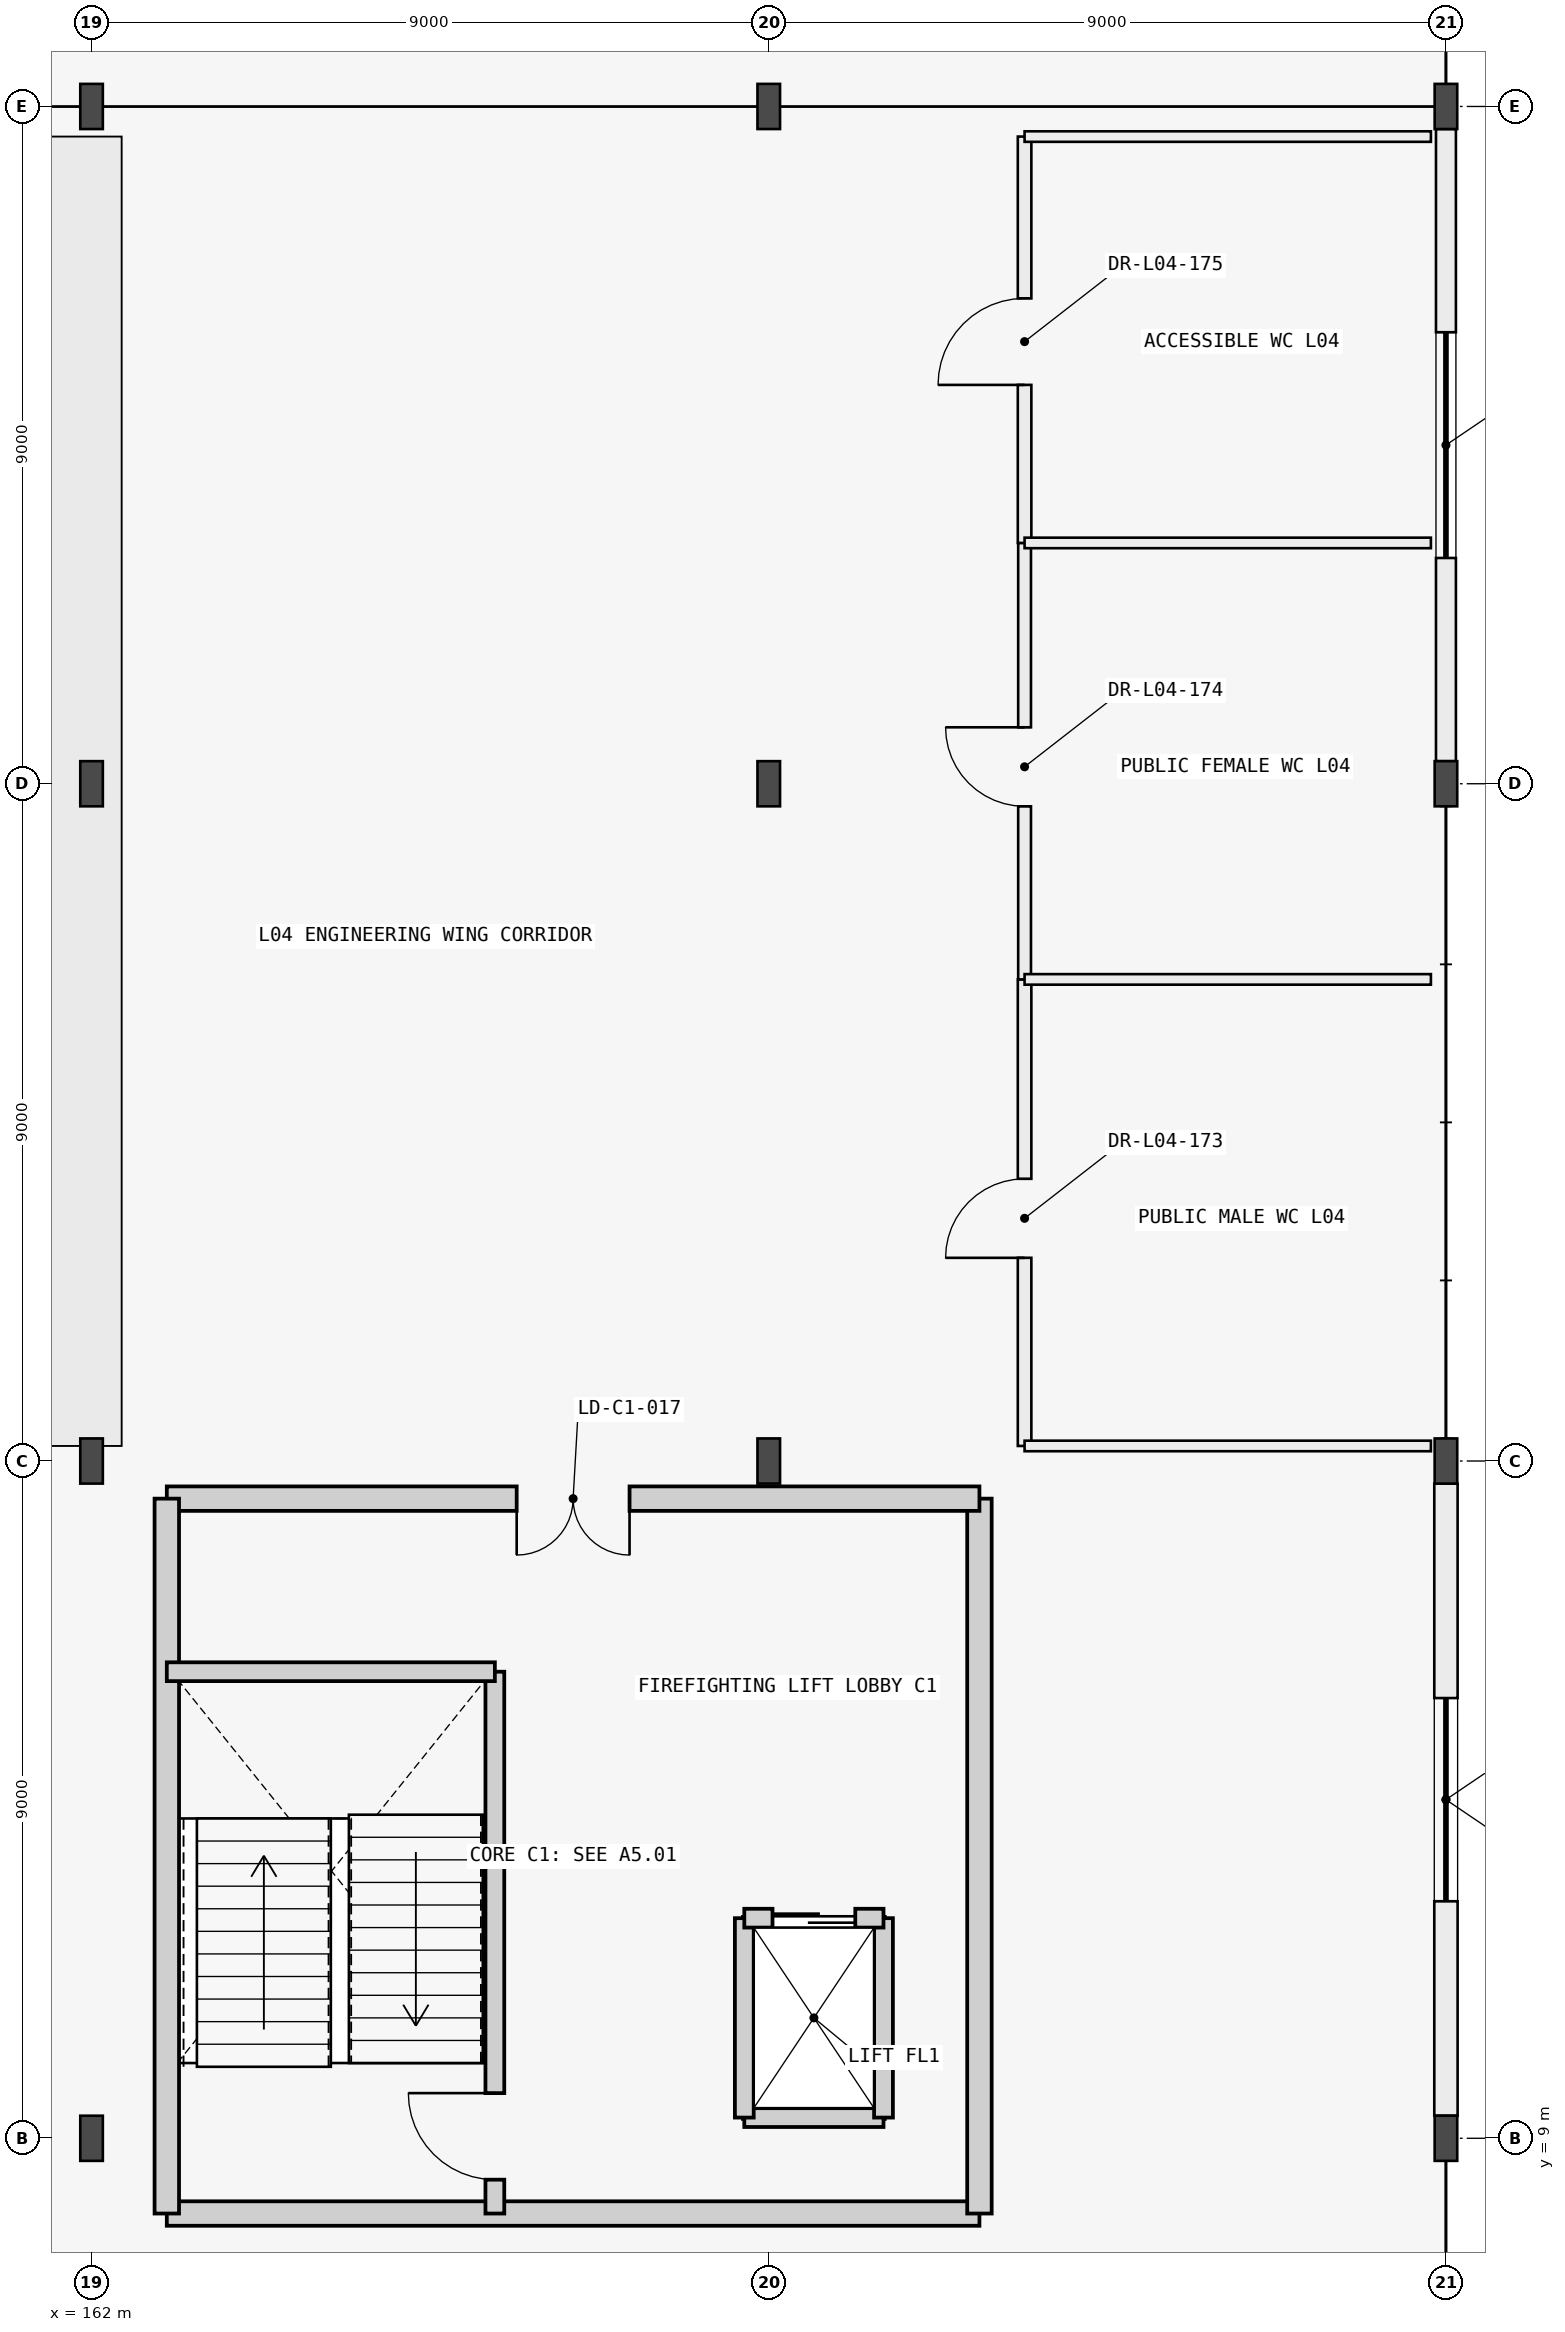
"""IFC4 building model, lengths in metres.
Left out: names, types, materials, properties, quantities, classifications, styles, units other than length and angle.
Written with IfcOpenShell. Run it as: python <this file> out.ifc"""

import sys

from ifc_helpers import new_model, si_unit, direction, frame, frame_2d, origin, origin_2d, place, context, subcontext, project, spatial, rectangle, i_section, extrude, element, fill, save


model = new_model("IFC4")
c1 = context("Model", 3, precision=1e-05, world=origin(), true_north=direction((0.0, 1.0)))
c2 = subcontext(c1, "Body", "Model", "MODEL_VIEW")
j1 = project(units=[si_unit("LENGTHUNIT", "METRE"), si_unit("PLANEANGLEUNIT", "RADIAN")], contexts=[c1])
p1 = place(None, origin())
s1 = spatial("IfcSite", under=j1, at=p1, CompositionType="ELEMENT")
p2 = place(p1, origin())
s2 = spatial("IfcBuilding", under=s1, at=p2, CompositionType="ELEMENT")
p3 = place(p2, frame((0.0, 0.0, 16.8)))
s3 = spatial("IfcBuildingStorey", under=s2, at=p3, CompositionType="ELEMENT", Elevation=16.8)
for number, where, z_axis, x_axis in (
    (1, (162.0, 9.0, 0.0), (0.0, 0.0, 1.0), (1.0, 0.0, 0.0)),
    (2, (180.0, 9.0, 0.0), (0.0, 0.0, 1.0), (1.0, 0.0, 0.0)),
    (3, (162.0, 18.0, 0.0), (0.0, 0.0, 1.0), (1.0, 0.0, 0.0)),
    (4, (171.0, 18.0, 0.0), (0.0, 0.0, 1.0), (1.0, 0.0, 0.0)),
    (5, (180.0, 18.0, 0.0), (0.0, 0.0, 1.0), (1.0, 0.0, 0.0)),
    (6, (162.0, 27.0, 0.0), (0.0, 0.0, 1.0), (1.0, 0.0, 0.0)),
    (7, (171.0, 27.0, 0.0), (0.0, 0.0, 1.0), (1.0, 0.0, 0.0)),
    (8, (180.0, 27.0, 0.0), (0.0, 0.0, 1.0), (1.0, 0.0, 0.0)),
    (9, (162.0, 36.0, 0.0), (0.0, 0.0, 1.0), (1.0, 0.0, 0.0)),
    (10, (171.0, 36.0, 0.0), (0.0, 0.0, 1.0), (1.0, 0.0, 0.0)),
    (11, (180.0, 36.0, 0.0), (0.0, 0.0, 1.0), (1.0, 0.0, 0.0)),
):
    element("IfcColumn", number, at=place(p3, frame(where, z_axis=z_axis, x_axis=x_axis)), inside=s3, PredefinedType="COLUMN", context=c2, shape_type="SweptSolid", body=[
        extrude(i_section(OverallWidth=0.3, OverallDepth=0.6, WebThickness=0.015, FlangeThickness=0.03, FilletRadius=0.027, at=origin_2d()), origin(), (0.0, 0.0, 1.0), 4.2),
    ])
p4 = place(p3, frame((180.0, 9.3, 0.0), z_axis=(0.0, 0.0, 1.0), x_axis=(0.0, 1.0, 0.0)))
e12 = element("IfcWall", 12, at=p4, inside=s3, PredefinedType="STANDARD", context=c2, shape_type="SweptSolid", body=[
    extrude(rectangle(XDim=8.4, YDim=0.31, at=frame_2d((4.2, 0.0))), origin(), (0.0, 0.0, 1.0), 3.63),
])
p5 = place(p4, frame((2.85, 0.0, 0.95)))
e13 = element("IfcOpeningElement", 13, at=p5, cuts=e12, PredefinedType="OPENING", context=c2, shape_type="SweptSolid", body=[
    extrude(rectangle(XDim=2.7, YDim=1.6, at=frame_2d((1.35, 0.8))), frame((0.0, 0.165, 0.0), z_axis=(0.0, -1.0, 0.0), x_axis=(1.0, 0.0, 0.0)), (0.0, 0.0, 1.0), 0.33),
])
p6 = place(p3, frame((180.0, 27.3, 0.0), z_axis=(0.0, 0.0, 1.0), x_axis=(0.0, 1.0, 0.0)))
e14 = element("IfcWall", 14, at=p6, inside=s3, PredefinedType="STANDARD", context=c2, shape_type="SweptSolid", body=[
    extrude(rectangle(XDim=8.4, YDim=0.265, at=frame_2d((4.2, 0.0))), origin(), (0.0, 0.0, 1.0), 3.63),
])
p7 = place(p6, frame((2.7, 0.0, 0.95)))
e15 = element("IfcOpeningElement", 15, at=p7, cuts=e14, PredefinedType="OPENING", context=c2, shape_type="SweptSolid", body=[
    extrude(rectangle(XDim=3.0, YDim=1.8, at=frame_2d((1.5, 0.9))), frame((0.0, 0.143, 0.0), z_axis=(0.0, -1.0, 0.0), x_axis=(1.0, 0.0, 0.0)), (0.0, 0.0, 1.0), 0.285),
])
p8 = place(p3, frame((163.0, 8.0, 0.0), z_axis=(0.0, 0.0, 1.0), x_axis=(1.0, 0.0, 0.0)))
e16 = element("IfcWall", 16, at=p8, inside=s3, PredefinedType="SHEAR", context=c2, shape_type="SweptSolid", body=[
    extrude(rectangle(XDim=10.8, YDim=0.325, at=frame_2d((5.4, 0.0))), origin(), (0.0, 0.0, 1.0), 3.955),
])
p9 = place(p3, frame((173.8, 8.0, 0.0), z_axis=(0.0, 0.0, 1.0), x_axis=(0.0, 1.0, 0.0)))
e17 = element("IfcWall", 17, at=p9, inside=s3, PredefinedType="SHEAR", context=c2, shape_type="SweptSolid", body=[
    extrude(rectangle(XDim=9.5, YDim=0.325, at=frame_2d((4.75, 0.0))), origin(), (0.0, 0.0, 1.0), 3.955),
])
p10 = place(p3, frame((173.8, 17.5, 0.0), z_axis=(0.0, 0.0, 1.0), x_axis=(-1.0, 0.0, 0.0)))
e18 = element("IfcWall", 18, at=p10, inside=s3, PredefinedType="SHEAR", context=c2, shape_type="SweptSolid", body=[
    extrude(rectangle(XDim=10.8, YDim=0.325, at=frame_2d((5.4, 0.0))), origin(), (0.0, 0.0, 1.0), 3.955),
])
p11 = place(p10, frame((4.65, 0.0, 0.0)))
e19 = element("IfcOpeningElement", 19, at=p11, cuts=e18, PredefinedType="OPENING", context=c2, shape_type="SweptSolid", body=[
    extrude(rectangle(XDim=1.5, YDim=2.2, at=frame_2d((0.75, 1.1))), frame((0.0, 0.172, 0.0), z_axis=(0.0, -1.0, 0.0), x_axis=(1.0, 0.0, 0.0)), (0.0, 0.0, 1.0), 0.345),
])
p12 = place(p3, frame((163.0, 17.5, 0.0), z_axis=(0.0, 0.0, 1.0), x_axis=(0.0, -1.0, 0.0)))
e20 = element("IfcWall", 20, at=p12, inside=s3, PredefinedType="SHEAR", context=c2, shape_type="SweptSolid", body=[
    extrude(rectangle(XDim=9.5, YDim=0.325, at=frame_2d((4.75, 0.0))), origin(), (0.0, 0.0, 1.0), 3.955),
])
p13 = place(p3, frame((167.36, 8.0, 0.0), z_axis=(0.0, 0.0, 1.0), x_axis=(0.0, 1.0, 0.0)))
e21 = element("IfcWall", 21, at=p13, inside=s3, PredefinedType="SHEAR", context=c2, shape_type="SweptSolid", body=[
    extrude(rectangle(XDim=7.2, YDim=0.25, at=frame_2d((3.6, 0.0))), origin(), (0.0, 0.0, 1.0), 3.955),
])
p14 = place(p13, frame((0.45, 0.0, 0.0)))
e22 = element("IfcOpeningElement", 22, at=p14, cuts=e21, PredefinedType="OPENING", context=c2, shape_type="SweptSolid", body=[
    extrude(rectangle(XDim=1.15, YDim=2.15, at=frame_2d((0.575, 1.075))), frame((0.0, 0.135, 0.0), z_axis=(0.0, -1.0, 0.0), x_axis=(1.0, 0.0, 0.0)), (0.0, 0.0, 1.0), 0.27),
])
p15 = place(p3, frame((163.0, 15.2, 0.0), z_axis=(0.0, 0.0, 1.0), x_axis=(1.0, 0.0, 0.0)))
e23 = element("IfcWall", 23, at=p15, inside=s3, PredefinedType="SHEAR", context=c2, shape_type="SweptSolid", body=[
    extrude(rectangle(XDim=4.36, YDim=0.25, at=frame_2d((2.18, 0.0))), origin(), (0.0, 0.0, 1.0), 3.955),
])
p16 = place(p3, frame((170.675, 9.275, 0.0), z_axis=(0.0, 0.0, 1.0), x_axis=(1.0, 0.0, 0.0)))
e24 = element("IfcWall", 24, at=p16, inside=s3, PredefinedType="SHEAR", context=c2, shape_type="SweptSolid", body=[
    extrude(rectangle(XDim=1.85, YDim=0.25, at=frame_2d((0.925, 0.0))), origin(), (0.0, 0.0, 1.0), 3.955),
])
for number, where, z_axis, x_axis in (
    (25, (170.675, 9.275, 0.0), (0.0, 0.0, 1.0), (0.0, 1.0, 0.0)),
    (26, (172.525, 9.275, 0.0), (0.0, 0.0, 1.0), (0.0, 1.0, 0.0)),
):
    element("IfcWall", number, at=place(p3, frame(where, z_axis=z_axis, x_axis=x_axis)), inside=s3, PredefinedType="SHEAR", context=c2, shape_type="SweptSolid", body=[
        extrude(rectangle(XDim=2.65, YDim=0.25, at=frame_2d((1.325, 0.0))), origin(), (0.0, 0.0, 1.0), 3.955),
    ])
p17 = place(p3, frame((170.675, 11.925, 0.0), z_axis=(0.0, 0.0, 1.0), x_axis=(1.0, 0.0, 0.0)))
e27 = element("IfcWall", 27, at=p17, inside=s3, PredefinedType="SHEAR", context=c2, shape_type="SweptSolid", body=[
    extrude(rectangle(XDim=1.85, YDim=0.25, at=frame_2d((0.925, 0.0))), origin(), (0.0, 0.0, 1.0), 3.955),
])
p18 = place(p17, frame((0.375, 0.0, 0.0)))
e28 = element("IfcOpeningElement", 28, at=p18, cuts=e27, PredefinedType="OPENING", context=c2, shape_type="SweptSolid", body=[
    extrude(rectangle(XDim=1.1, YDim=2.15, at=frame_2d((0.55, 1.075))), frame((0.0, 0.135, 0.0), z_axis=(0.0, -1.0, 0.0), x_axis=(1.0, 0.0, 0.0)), (0.0, 0.0, 1.0), 0.27),
])
p19 = place(p3, frame((174.4, 18.2, 0.0), z_axis=(0.0, 0.0, 1.0), x_axis=(0.0, 1.0, 0.0)))
e29 = element("IfcWall", 29, at=p19, inside=s3, PredefinedType="PARTITIONING", context=c2, shape_type="SweptSolid", body=[
    extrude(rectangle(XDim=6.2, YDim=0.18, at=frame_2d((3.1, 0.0))), origin(), (0.0, 0.0, 1.0), 3.63),
])
p20 = place(p19, frame((2.5, 0.0, 0.0)))
e30 = element("IfcOpeningElement", 30, at=p20, cuts=e29, PredefinedType="OPENING", context=c2, shape_type="SweptSolid", body=[
    extrude(rectangle(XDim=1.05, YDim=2.1, at=frame_2d((0.525, 1.05))), frame((0.0, 0.1, 0.0), z_axis=(0.0, -1.0, 0.0), x_axis=(1.0, 0.0, 0.0)), (0.0, 0.0, 1.0), 0.2),
])
p21 = place(p3, frame((174.4, 24.4, 0.0), z_axis=(0.0, 0.0, 1.0), x_axis=(0.0, 1.0, 0.0)))
e31 = element("IfcWall", 31, at=p21, inside=s3, PredefinedType="PARTITIONING", context=c2, shape_type="SweptSolid", body=[
    extrude(rectangle(XDim=5.8, YDim=0.17, at=frame_2d((2.9, 0.0))), origin(), (0.0, 0.0, 1.0), 3.63),
])
p22 = place(p21, frame((2.3, 0.0, 0.0)))
e32 = element("IfcOpeningElement", 32, at=p22, cuts=e31, PredefinedType="OPENING", context=c2, shape_type="SweptSolid", body=[
    extrude(rectangle(XDim=1.05, YDim=2.1, at=frame_2d((0.525, 1.05))), frame((0.0, 0.095, 0.0), z_axis=(0.0, -1.0, 0.0), x_axis=(1.0, 0.0, 0.0)), (0.0, 0.0, 1.0), 0.19),
])
p23 = place(p3, frame((174.4, 30.2, 0.0), z_axis=(0.0, 0.0, 1.0), x_axis=(0.0, 1.0, 0.0)))
e33 = element("IfcWall", 33, at=p23, inside=s3, PredefinedType="PARTITIONING", context=c2, shape_type="SweptSolid", body=[
    extrude(rectangle(XDim=5.4, YDim=0.18, at=frame_2d((2.7, 0.0))), origin(), (0.0, 0.0, 1.0), 3.63),
])
p24 = place(p23, frame((2.1, 0.0, 0.0)))
e34 = element("IfcOpeningElement", 34, at=p24, cuts=e33, PredefinedType="OPENING", context=c2, shape_type="SweptSolid", body=[
    extrude(rectangle(XDim=1.15, YDim=2.15, at=frame_2d((0.575, 1.075))), frame((0.0, 0.1, 0.0), z_axis=(0.0, -1.0, 0.0), x_axis=(1.0, 0.0, 0.0)), (0.0, 0.0, 1.0), 0.2),
])
p25 = place(p3, frame((174.4, 18.2, 0.0), z_axis=(0.0, 0.0, 1.0), x_axis=(1.0, 0.0, 0.0)))
e35 = element("IfcWall", 35, at=p25, inside=s3, PredefinedType="PARTITIONING", context=c2, shape_type="SweptSolid", body=[
    extrude(rectangle(XDim=5.4, YDim=0.14, at=frame_2d((2.7, 0.0))), origin(), (0.0, 0.0, 1.0), 3.43),
])
for number, where, z_axis, x_axis in (
    (36, (174.4, 24.4, 0.0), (0.0, 0.0, 1.0), (1.0, 0.0, 0.0)),
    (37, (174.4, 30.2, 0.0), (0.0, 0.0, 1.0), (1.0, 0.0, 0.0)),
):
    element("IfcWall", number, at=place(p3, frame(where, z_axis=z_axis, x_axis=x_axis)), inside=s3, PredefinedType="PARTITIONING", context=c2, shape_type="SweptSolid", body=[
        extrude(rectangle(XDim=5.4, YDim=0.14, at=frame_2d((2.7, 0.0))), origin(), (0.0, 0.0, 1.0), 3.955),
    ])
p26 = place(p3, frame((174.4, 35.6, 0.0), z_axis=(0.0, 0.0, 1.0), x_axis=(1.0, 0.0, 0.0)))
e38 = element("IfcWall", 38, at=p26, inside=s3, PredefinedType="PARTITIONING", context=c2, shape_type="SweptSolid", body=[
    extrude(rectangle(XDim=5.4, YDim=0.14, at=frame_2d((2.7, 0.0))), origin(), (0.0, 0.0, 1.0), 3.43),
])
p27 = place(p5, origin())
e39 = element("IfcWindow", 39, at=p27, inside=s3, PartitioningType="SINGLE_PANEL", PredefinedType="WINDOW", context=c2, shape_type="SweptSolid", body=[
    extrude(rectangle(XDim=2.7, YDim=1.6, at=frame_2d((1.35, 0.8))), frame((0.0, 0.03, 0.0), z_axis=(0.0, -1.0, 0.0), x_axis=(1.0, 0.0, 0.0)), (0.0, 0.0, 1.0), 0.06),
])
fill(e13, e39)
p28 = place(p7, origin())
e40 = element("IfcWindow", 40, at=p28, inside=s3, PartitioningType="SINGLE_PANEL", PredefinedType="WINDOW", context=c2, shape_type="SweptSolid", body=[
    extrude(rectangle(XDim=3.0, YDim=1.8, at=frame_2d((1.5, 0.9))), frame((0.0, 0.03, 0.0), z_axis=(0.0, -1.0, 0.0), x_axis=(1.0, 0.0, 0.0)), (0.0, 0.0, 1.0), 0.06),
])
fill(e15, e40)
p29 = place(p14, origin())
e41 = element("IfcDoor", 41, at=p29, inside=s3, OperationType="SINGLE_SWING_RIGHT", PredefinedType="DOOR", context=c2, shape_type="SweptSolid", body=[
    extrude(rectangle(XDim=1.15, YDim=2.15, at=frame_2d((0.575, 1.075))), frame((0.0, 0.025, 0.0), z_axis=(0.0, -1.0, 0.0), x_axis=(1.0, 0.0, 0.0)), (0.0, 0.0, 1.0), 0.05),
])
fill(e22, e41)
p30 = place(p11, origin())
e42 = element("IfcDoor", 42, at=p30, inside=s3, OperationType="DOUBLE_DOOR_SINGLE_SWING", PredefinedType="DOOR", context=c2, shape_type="SweptSolid", body=[
    extrude(rectangle(XDim=1.5, YDim=2.2, at=frame_2d((0.75, 1.1))), frame((0.0, 0.025, 0.0), z_axis=(0.0, -1.0, 0.0), x_axis=(1.0, 0.0, 0.0)), (0.0, 0.0, 1.0), 0.05),
])
fill(e19, e42)
p31 = place(p18, origin())
e43 = element("IfcDoor", 43, at=p31, inside=s3, OperationType="DOUBLE_DOOR_SLIDING", PredefinedType="USERDEFINED", context=c2, shape_type="SweptSolid", body=[
    extrude(rectangle(XDim=1.1, YDim=2.15, at=frame_2d((0.55, 1.075))), frame((0.0, 0.025, 0.0), z_axis=(0.0, -1.0, 0.0), x_axis=(1.0, 0.0, 0.0)), (0.0, 0.0, 1.0), 0.05),
])
fill(e28, e43)
p32 = place(p20, origin())
e44 = element("IfcDoor", 44, at=p32, inside=s3, OperationType="SINGLE_SWING_LEFT", PredefinedType="DOOR", context=c2, shape_type="SweptSolid", body=[
    extrude(rectangle(XDim=1.05, YDim=2.1, at=frame_2d((0.525, 1.05))), frame((0.0, 0.025, 0.0), z_axis=(0.0, -1.0, 0.0), x_axis=(1.0, 0.0, 0.0)), (0.0, 0.0, 1.0), 0.05),
])
fill(e30, e44)
p33 = place(p22, origin())
e45 = element("IfcDoor", 45, at=p33, inside=s3, OperationType="SINGLE_SWING_RIGHT", PredefinedType="DOOR", context=c2, shape_type="SweptSolid", body=[
    extrude(rectangle(XDim=1.05, YDim=2.1, at=frame_2d((0.525, 1.05))), frame((0.0, 0.025, 0.0), z_axis=(0.0, -1.0, 0.0), x_axis=(1.0, 0.0, 0.0)), (0.0, 0.0, 1.0), 0.05),
])
fill(e32, e45)
p34 = place(p24, origin())
e46 = element("IfcDoor", 46, at=p34, inside=s3, OperationType="SINGLE_SWING_LEFT", PredefinedType="DOOR", context=c2, shape_type="SweptSolid", body=[
    extrude(rectangle(XDim=1.15, YDim=2.15, at=frame_2d((0.575, 1.075))), frame((0.0, 0.025, 0.0), z_axis=(0.0, -1.0, 0.0), x_axis=(1.0, 0.0, 0.0)), (0.0, 0.0, 1.0), 0.05),
])
fill(e34, e46)
save(model, sys.argv[1])
